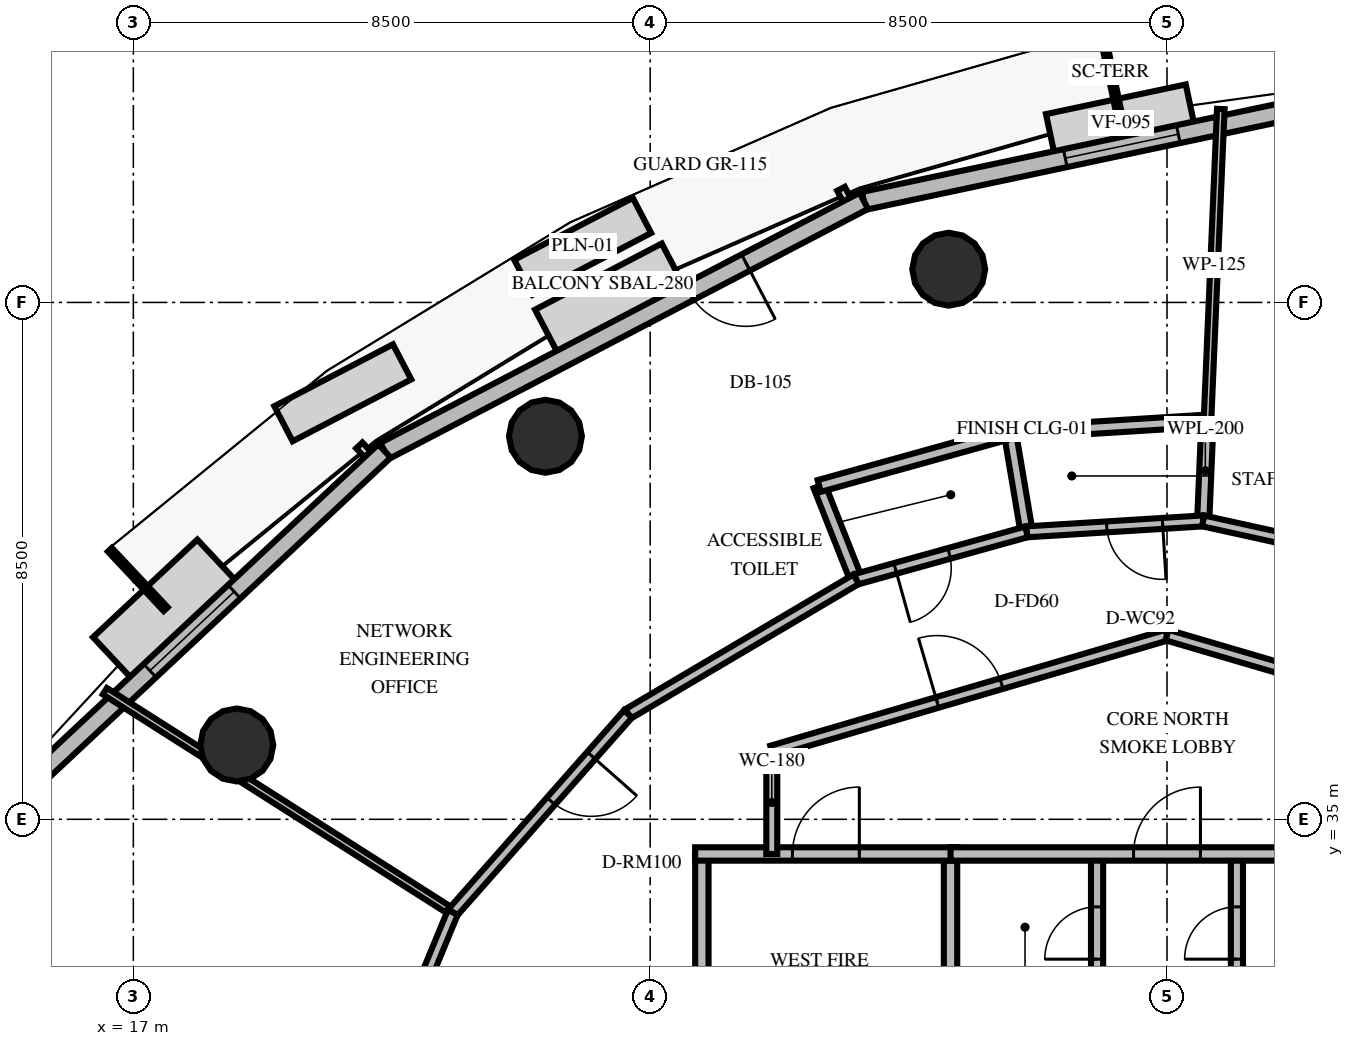
"""IFC4 building model, lengths in metres.
Left out: names, types, materials, properties, quantities, classifications, styles, units other than length and angle.
Written with IfcOpenShell. Run it as: python <this file> out.ifc"""

import sys

from ifc_helpers import new_model, si_unit, direction, frame, frame_2d, origin, origin_2d, place, context, subcontext, project, spatial, rectangle, circle, extrude, element, fill, save


model = new_model("IFC4")
c1 = context("Model", 3, precision=1e-05, world=origin(), true_north=direction((0.0, 1.0)))
c2 = subcontext(c1, "Body", "Model", "MODEL_VIEW")
j1 = project(units=[si_unit("LENGTHUNIT", "METRE"), si_unit("PLANEANGLEUNIT", "RADIAN")], contexts=[c1])
p1 = place(None, origin())
s1 = spatial("IfcSite", under=j1, at=p1, CompositionType="ELEMENT")
p2 = place(p1, origin())
s2 = spatial("IfcBuilding", under=s1, at=p2, CompositionType="ELEMENT")
p3 = place(p2, frame((0.0, 0.0, 149.8)))
s3 = spatial("IfcBuildingStorey", under=s2, at=p3, CompositionType="ELEMENT", Elevation=149.8)
for number, where, z_axis, x_axis in (
    (1, (30.41, 44.046, 0.0), (0.0, 0.0, 1.0), (1.0, 0.0, 0.0)),
    (2, (23.778, 41.299, 0.0), (0.0, 0.0, 1.0), (1.0, 0.0, 0.0)),
    (3, (18.701, 36.222, 0.0), (0.0, 0.0, 1.0), (1.0, 0.0, 0.0)),
):
    element("IfcColumn", number, at=place(p3, frame(where, z_axis=z_axis, x_axis=x_axis)), inside=s3, PredefinedType="COLUMN", context=c2, shape_type="SweptSolid", body=[
        extrude(circle(Radius=0.6, at=origin_2d()), origin(), (0.0, 0.0, 1.0), 4.0),
    ])
p4 = place(p3, frame((37.498, 46.97, 0.0), z_axis=(0.0, 0.0, 1.0), x_axis=(-0.978225120282, -0.207546655113, 0.0)))
e4 = element("IfcWall", 4, at=p4, inside=s3, PredefinedType="SOLIDWALL", context=c2, shape_type="SweptSolid", body=[
    extrude(rectangle(XDim=8.673, YDim=0.3, at=frame_2d((4.336, 0.0))), origin(), (0.0, 0.0, 1.0), 2.9),
])
p5 = place(p4, frame((3.386, 0.0, 0.8)))
e5 = element("IfcOpeningElement", 5, at=p5, cuts=e4, PredefinedType="OPENING", context=c2, shape_type="SweptSolid", body=[
    extrude(rectangle(XDim=1.9, YDim=1.95, at=frame_2d((0.95, 0.975))), frame((0.0, 0.16, 0.0), z_axis=(0.0, -1.0, 0.0), x_axis=(1.0, 0.0, 0.0)), (0.0, 0.0, 1.0), 0.32),
])
p6 = place(p3, frame((29.014, 45.17, 0.0), z_axis=(0.0, 0.0, 1.0), x_axis=(-0.886600513761, -0.462535975897, 0.0)))
e6 = element("IfcWall", 6, at=p6, inside=s3, PredefinedType="SOLIDWALL", context=c2, shape_type="SweptSolid", body=[
    extrude(rectangle(XDim=8.891, YDim=0.3, at=frame_2d((4.445, 0.0))), origin(), (0.0, 0.0, 1.0), 2.9),
])
p7 = place(p6, frame((2.19, 0.0, 0.0)))
e7 = element("IfcOpeningElement", 7, at=p7, cuts=e6, PredefinedType="OPENING", context=c2, shape_type="SweptSolid", body=[
    extrude(rectangle(XDim=1.05, YDim=2.15, at=frame_2d((0.525, 1.075))), frame((0.0, 0.16, 0.0), z_axis=(0.0, -1.0, 0.0), x_axis=(1.0, 0.0, 0.0)), (0.0, 0.0, 1.0), 0.32),
])
p8 = place(p3, frame((21.131, 41.057, 0.0), z_axis=(0.0, 0.0, 1.0), x_axis=(-0.729921586767, -0.683530889698, 0.0)))
e8 = element("IfcWall", 8, at=p8, inside=s3, PredefinedType="SOLIDWALL", context=c2, shape_type="SweptSolid", body=[
    extrude(rectangle(XDim=8.673, YDim=0.3, at=frame_2d((4.336, 0.0))), origin(), (0.0, 0.0, 1.0), 2.9),
])
p9 = place(p8, frame((3.386, 0.0, 0.8)))
e9 = element("IfcOpeningElement", 9, at=p9, cuts=e8, PredefinedType="OPENING", context=c2, shape_type="SweptSolid", body=[
    extrude(rectangle(XDim=1.9, YDim=1.95, at=frame_2d((0.95, 0.975))), frame((0.0, 0.16, 0.0), z_axis=(0.0, -1.0, 0.0), x_axis=(1.0, 0.0, 0.0)), (0.0, 0.0, 1.0), 0.32),
])
p10 = place(p3, frame((26.35, 30.05, 0.0), z_axis=(0.0, 0.0, 1.0), x_axis=(0.0, 1.0, 0.0)))
e10 = element("IfcWall", 10, at=p10, inside=s3, PredefinedType="SOLIDWALL", context=c2, shape_type="SweptSolid", body=[
    extrude(rectangle(XDim=4.38, YDim=0.22, at=frame_2d((2.19, 0.0))), origin(), (0.0, 0.0, 1.0), 2.8),
])
p11 = place(p3, frame((30.44, 30.05, 0.0), z_axis=(0.0, 0.0, 1.0), x_axis=(0.0, 1.0, 0.0)))
e11 = element("IfcWall", 11, at=p11, inside=s3, PredefinedType="SOLIDWALL", context=c2, shape_type="SweptSolid", body=[
    extrude(rectangle(XDim=4.38, YDim=0.22, at=frame_2d((2.19, 0.0))), origin(), (0.0, 0.0, 1.0), 2.8),
])
p12 = place(p11, frame((0.8, 0.0, 0.0)))
e12 = element("IfcOpeningElement", 12, at=p12, cuts=e11, PredefinedType="OPENING", context=c2, shape_type="SweptSolid", body=[
    extrude(rectangle(XDim=1.05, YDim=2.1, at=frame_2d((0.525, 1.05))), frame((0.0, 0.12, 0.0), z_axis=(0.0, -1.0, 0.0), x_axis=(1.0, 0.0, 0.0)), (0.0, 0.0, 1.0), 0.24),
])
p13 = place(p3, frame((26.24, 34.43, 0.0), z_axis=(0.0, 0.0, 1.0), x_axis=(1.0, 0.0, 0.0)))
e13 = element("IfcWall", 13, at=p13, inside=s3, PredefinedType="SOLIDWALL", context=c2, shape_type="SweptSolid", body=[
    extrude(rectangle(XDim=4.31, YDim=0.22, at=frame_2d((2.155, 0.0))), origin(), (0.0, 0.0, 1.0), 2.8),
])
p14 = place(p13, frame((1.6, 0.0, 0.0)))
e14 = element("IfcOpeningElement", 14, at=p14, cuts=e13, PredefinedType="OPENING", context=c2, shape_type="SweptSolid", body=[
    extrude(rectangle(XDim=1.1, YDim=2.15, at=frame_2d((0.55, 1.075))), frame((0.0, 0.12, 0.0), z_axis=(0.0, -1.0, 0.0), x_axis=(1.0, 0.0, 0.0)), (0.0, 0.0, 1.0), 0.24),
])
p15 = place(p3, frame((32.85, 30.05, 0.0), z_axis=(0.0, 0.0, 1.0), x_axis=(0.0, 1.0, 0.0)))
e15 = element("IfcWall", 15, at=p15, inside=s3, PredefinedType="SOLIDWALL", context=c2, shape_type="SweptSolid", body=[
    extrude(rectangle(XDim=4.38, YDim=0.2, at=frame_2d((2.19, 0.0))), origin(), (0.0, 0.0, 1.0), 2.8),
])
p16 = place(p15, frame((2.65, 0.0, 0.0)))
e16 = element("IfcOpeningElement", 16, at=p16, cuts=e15, PredefinedType="OPENING", context=c2, shape_type="SweptSolid", body=[
    extrude(rectangle(XDim=0.86, YDim=2.05, at=frame_2d((0.43, 1.025))), frame((0.0, 0.11, 0.0), z_axis=(0.0, -1.0, 0.0), x_axis=(1.0, 0.0, 0.0)), (0.0, 0.0, 1.0), 0.22),
])
p17 = place(p3, frame((35.15, 30.05, 0.0), z_axis=(0.0, 0.0, 1.0), x_axis=(0.0, 1.0, 0.0)))
e17 = element("IfcWall", 17, at=p17, inside=s3, PredefinedType="SOLIDWALL", context=c2, shape_type="SweptSolid", body=[
    extrude(rectangle(XDim=4.38, YDim=0.2, at=frame_2d((2.19, 0.0))), origin(), (0.0, 0.0, 1.0), 2.8),
])
p18 = place(p17, frame((2.65, 0.0, 0.0)))
e18 = element("IfcOpeningElement", 18, at=p18, cuts=e17, PredefinedType="OPENING", context=c2, shape_type="SweptSolid", body=[
    extrude(rectangle(XDim=0.86, YDim=2.05, at=frame_2d((0.43, 1.025))), frame((0.0, 0.11, 0.0), z_axis=(0.0, -1.0, 0.0), x_axis=(1.0, 0.0, 0.0)), (0.0, 0.0, 1.0), 0.22),
])
p19 = place(p3, frame((30.44, 34.43, 0.0), z_axis=(0.0, 0.0, 1.0), x_axis=(1.0, 0.0, 0.0)))
e19 = element("IfcWall", 19, at=p19, inside=s3, PredefinedType="SOLIDWALL", context=c2, shape_type="SweptSolid", body=[
    extrude(rectangle(XDim=7.12, YDim=0.22, at=frame_2d((3.56, 0.0))), origin(), (0.0, 0.0, 1.0), 2.8),
])
p20 = place(p19, frame((3.01, 0.0, 0.0)))
e20 = element("IfcOpeningElement", 20, at=p20, cuts=e19, PredefinedType="OPENING", context=c2, shape_type="SweptSolid", body=[
    extrude(rectangle(XDim=1.1, YDim=2.15, at=frame_2d((0.55, 1.075))), frame((0.0, 0.12, 0.0), z_axis=(0.0, -1.0, 0.0), x_axis=(1.0, 0.0, 0.0)), (0.0, 0.0, 1.0), 0.24),
])
p21 = place(p3, frame((27.5, 34.43, 0.0), z_axis=(0.0, 0.0, 1.0), x_axis=(0.0, 1.0, 0.0)))
e21 = element("IfcWall", 21, at=p21, inside=s3, PredefinedType="PARTITIONING", context=c2, shape_type="SweptSolid", body=[
    extrude(rectangle(XDim=1.693, YDim=0.18, at=frame_2d((0.846, 0.0))), origin(), (0.0, 0.0, 1.0), 2.8),
])
p22 = place(p3, frame((27.5, 36.123, 0.0), z_axis=(0.0, 0.0, 1.0), x_axis=(0.959546654541, 0.281549671923, 0.0)))
e22 = element("IfcWall", 22, at=p22, inside=s3, PredefinedType="PARTITIONING", context=c2, shape_type="SweptSolid", body=[
    extrude(rectangle(XDim=6.774, YDim=0.18, at=frame_2d((3.387, 0.0))), origin(), (0.0, 0.0, 1.0), 2.8),
])
p23 = place(p22, frame((2.837, 0.0, 0.0)))
e23 = element("IfcOpeningElement", 23, at=p23, cuts=e22, PredefinedType="OPENING", context=c2, shape_type="SweptSolid", body=[
    extrude(rectangle(XDim=1.1, YDim=2.15, at=frame_2d((0.55, 1.075))), frame((0.0, 0.1, 0.0), z_axis=(0.0, -1.0, 0.0), x_axis=(1.0, 0.0, 0.0)), (0.0, 0.0, 1.0), 0.2),
])
p24 = place(p3, frame((34.0, 38.03, 0.0), z_axis=(0.0, 0.0, 1.0), x_axis=(0.959546654541, -0.281549671923, 0.0)))
e24 = element("IfcWall", 24, at=p24, inside=s3, PredefinedType="PARTITIONING", context=c2, shape_type="SweptSolid", body=[
    extrude(rectangle(XDim=6.774, YDim=0.18, at=frame_2d((3.387, 0.0))), origin(), (0.0, 0.0, 1.0), 2.8),
])
p25 = place(p24, frame((2.837, 0.0, 0.0)))
e25 = element("IfcOpeningElement", 25, at=p25, cuts=e24, PredefinedType="OPENING", context=c2, shape_type="SweptSolid", body=[
    extrude(rectangle(XDim=1.1, YDim=2.15, at=frame_2d((0.55, 1.075))), frame((0.0, 0.1, 0.0), z_axis=(0.0, -1.0, 0.0), x_axis=(1.0, 0.0, 0.0)), (0.0, 0.0, 1.0), 0.2),
])
for number, where, z_axis, x_axis in (
    (26, (34.595, 39.907, 0.0), (0.0, 0.0, 1.0), (0.043, 0.999, 0.0)),
    (27, (31.691, 39.727, 0.0), (0.0, 0.0, 1.0), (-0.166, 0.986, 0.0)),
):
    element("IfcWall", number, at=place(p3, frame(where, z_axis=z_axis, x_axis=x_axis)), inside=s3, PredefinedType="PLUMBINGWALL", context=c2, shape_type="SweptSolid", body=[
        extrude(rectangle(XDim=1.65, YDim=0.2, at=frame_2d((0.825, 0.0))), origin(), (0.0, 0.0, 1.0), 2.8),
    ])
p26 = place(p3, frame((34.666, 41.556, 0.0), z_axis=(0.0, 0.0, 1.0), x_axis=(-0.998079045884, -0.061953354768, 0.0)))
e28 = element("IfcWall", 28, at=p26, inside=s3, PredefinedType="PLUMBINGWALL", context=c2, shape_type="SweptSolid", body=[
    extrude(rectangle(XDim=3.255, YDim=0.2, at=frame_2d((1.627, 0.0))), origin(), (0.0, 0.0, 1.0), 2.8),
])
p27 = place(p3, frame((34.595, 39.907, 0.0), z_axis=(0.0, 0.0, 1.0), x_axis=(-0.998081201235, -0.061918621933, 0.0)))
e29 = element("IfcWall", 29, at=p27, inside=s3, PredefinedType="PARTITIONING", context=c2, shape_type="SweptSolid", body=[
    extrude(rectangle(XDim=2.91, YDim=0.18, at=frame_2d((1.455, 0.0))), origin(), (0.0, 0.0, 1.0), 2.8),
])
p28 = place(p27, frame((0.669, 0.0, 0.0)))
e30 = element("IfcOpeningElement", 30, at=p28, cuts=e29, PredefinedType="OPENING", context=c2, shape_type="SweptSolid", body=[
    extrude(rectangle(XDim=0.92, YDim=2.1, at=frame_2d((0.46, 1.05))), frame((0.0, 0.1, 0.0), z_axis=(0.0, -1.0, 0.0), x_axis=(1.0, 0.0, 0.0)), (0.0, 0.0, 1.0), 0.2),
])
p29 = place(p3, frame((28.887, 38.947, 0.0), z_axis=(0.0, 0.0, 1.0), x_axis=(-0.367254125324, 0.930120641332, 0.0)))
e31 = element("IfcWall", 31, at=p29, inside=s3, PredefinedType="PLUMBINGWALL", context=c2, shape_type="SweptSolid", body=[
    extrude(rectangle(XDim=1.65, YDim=0.2, at=frame_2d((0.825, 0.0))), origin(), (0.0, 0.0, 1.0), 2.8),
])
p30 = place(p3, frame((31.417, 41.354, 0.0), z_axis=(0.0, 0.0, 1.0), x_axis=(-0.963397456195, -0.268077118377, 0.0)))
e32 = element("IfcWall", 32, at=p30, inside=s3, PredefinedType="PLUMBINGWALL", context=c2, shape_type="SweptSolid", body=[
    extrude(rectangle(XDim=3.255, YDim=0.2, at=frame_2d((1.627, 0.0))), origin(), (0.0, 0.0, 1.0), 2.8),
])
p31 = place(p3, frame((31.691, 39.727, 0.0), z_axis=(0.0, 0.0, 1.0), x_axis=(-0.96340966142, -0.268033252197, 0.0)))
e33 = element("IfcWall", 33, at=p31, inside=s3, PredefinedType="PARTITIONING", context=c2, shape_type="SweptSolid", body=[
    extrude(rectangle(XDim=2.91, YDim=0.18, at=frame_2d((1.455, 0.0))), origin(), (0.0, 0.0, 1.0), 2.8),
])
p32 = place(p31, frame((1.321, 0.0, 0.0)))
e34 = element("IfcOpeningElement", 34, at=p32, cuts=e33, PredefinedType="OPENING", context=c2, shape_type="SweptSolid", body=[
    extrude(rectangle(XDim=0.92, YDim=2.1, at=frame_2d((0.46, 1.05))), frame((0.0, 0.1, 0.0), z_axis=(0.0, -1.0, 0.0), x_axis=(1.0, 0.0, 0.0)), (0.0, 0.0, 1.0), 0.2),
])
p33 = place(p3, frame((34.666, 41.556, 0.0), z_axis=(0.0, 0.0, 1.0), x_axis=(0.04278458553, 0.999084320386, 0.0)))
e35 = element("IfcWall", 35, at=p33, inside=s3, PredefinedType="PARTITIONING", context=c2, shape_type="SweptSolid", body=[
    extrude(rectangle(XDim=5.13, YDim=0.125, at=frame_2d((2.565, 0.0))), origin(), (0.0, 0.0, 1.0), 2.8),
])
p34 = place(p3, frame((22.253, 33.469, 0.0), z_axis=(0.0, 0.0, 1.0), x_axis=(-0.843860112371, 0.536563240215, 0.0)))
e36 = element("IfcWall", 36, at=p34, inside=s3, PredefinedType="PARTITIONING", context=c2, shape_type="SweptSolid", body=[
    extrude(rectangle(XDim=6.78, YDim=0.125, at=frame_2d((3.39, 0.0))), origin(), (0.0, 0.0, 1.0), 2.8),
])
p35 = place(p3, frame((28.887, 38.947, 0.0), z_axis=(0.0, 0.0, 1.0), x_axis=(-0.861185337558, -0.508291072493, 0.0)))
e37 = element("IfcWall", 37, at=p35, inside=s3, PredefinedType="PARTITIONING", context=c2, shape_type="SweptSolid", body=[
    extrude(rectangle(XDim=4.355, YDim=0.18, at=frame_2d((2.177, 0.0))), origin(), (0.0, 0.0, 1.0), 2.8),
])
p36 = place(p3, frame((25.136, 36.733, 0.0), z_axis=(0.0, 0.0, 1.0), x_axis=(-0.661970118679, -0.749530227526, 0.0)))
e38 = element("IfcWall", 38, at=p36, inside=s3, PredefinedType="PARTITIONING", context=c2, shape_type="SweptSolid", body=[
    extrude(rectangle(XDim=4.355, YDim=0.18, at=frame_2d((2.178, 0.0))), origin(), (0.0, 0.0, 1.0), 2.8),
])
p37 = place(p36, frame((0.914, 0.0, 0.0)))
e39 = element("IfcOpeningElement", 39, at=p37, cuts=e38, PredefinedType="OPENING", context=c2, shape_type="SweptSolid", body=[
    extrude(rectangle(XDim=1.0, YDim=2.15, at=frame_2d((0.5, 1.075))), frame((0.0, 0.1, 0.0), z_axis=(0.0, -1.0, 0.0), x_axis=(1.0, 0.0, 0.0)), (0.0, 0.0, 1.0), 0.2),
])
p38 = place(p3, frame((22.253, 33.469, 0.0), z_axis=(0.0, 0.0, 1.0), x_axis=(-0.381884883338, -0.924209898171, 0.0)))
e40 = element("IfcWall", 40, at=p38, inside=s3, PredefinedType="PARTITIONING", context=c2, shape_type="SweptSolid", body=[
    extrude(rectangle(XDim=4.834, YDim=0.18, at=frame_2d((2.417, 0.0))), origin(), (0.0, 0.0, 1.0), 2.8),
])
p39 = place(p38, frame((1.842, 0.0, 0.0)))
e41 = element("IfcOpeningElement", 41, at=p39, cuts=e40, PredefinedType="OPENING", context=c2, shape_type="SweptSolid", body=[
    extrude(rectangle(XDim=1.15, YDim=2.15, at=frame_2d((0.575, 1.075))), frame((0.0, 0.1, 0.0), z_axis=(0.0, -1.0, 0.0), x_axis=(1.0, 0.0, 0.0)), (0.0, 0.0, 1.0), 0.2),
])
p40 = place(p3, frame((39.316, 38.865, 0.0), z_axis=(0.0, 0.0, 1.0), x_axis=(-0.976484389615, 0.215588118498, 0.0)))
e42 = element("IfcWall", 42, at=p40, inside=s3, PredefinedType="PARTITIONING", context=c2, shape_type="SweptSolid", body=[
    extrude(rectangle(XDim=4.834, YDim=0.18, at=frame_2d((2.417, 0.0))), origin(), (0.0, 0.0, 1.0), 2.8),
])
p41 = place(p5, origin())
e43 = element("IfcWindow", 43, at=p41, inside=s3, PartitioningType="SINGLE_PANEL", PredefinedType="WINDOW", context=c2, shape_type="SweptSolid", body=[
    extrude(rectangle(XDim=1.9, YDim=1.95, at=frame_2d((0.95, 0.975))), frame((0.0, 0.03, 0.0), z_axis=(0.0, -1.0, 0.0), x_axis=(1.0, 0.0, 0.0)), (0.0, 0.0, 1.0), 0.06),
])
fill(e5, e43)
p42 = place(p7, origin())
e44 = element("IfcDoor", 44, at=p42, inside=s3, OperationType="SINGLE_SWING_LEFT", PredefinedType="DOOR", context=c2, shape_type="SweptSolid", body=[
    extrude(rectangle(XDim=1.05, YDim=2.15, at=frame_2d((0.525, 1.075))), frame((0.0, 0.025, 0.0), z_axis=(0.0, -1.0, 0.0), x_axis=(1.0, 0.0, 0.0)), (0.0, 0.0, 1.0), 0.05),
])
fill(e7, e44)
p43 = place(p9, origin())
e45 = element("IfcWindow", 45, at=p43, inside=s3, PartitioningType="SINGLE_PANEL", PredefinedType="WINDOW", context=c2, shape_type="SweptSolid", body=[
    extrude(rectangle(XDim=1.9, YDim=1.95, at=frame_2d((0.95, 0.975))), frame((0.0, 0.03, 0.0), z_axis=(0.0, -1.0, 0.0), x_axis=(1.0, 0.0, 0.0)), (0.0, 0.0, 1.0), 0.06),
])
fill(e9, e45)
p44 = place(p14, origin())
e46 = element("IfcDoor", 46, at=p44, inside=s3, OperationType="SINGLE_SWING_RIGHT", PredefinedType="DOOR", context=c2, shape_type="SweptSolid", body=[
    extrude(rectangle(XDim=1.1, YDim=2.15, at=frame_2d((0.55, 1.075))), frame((0.0, 0.025, 0.0), z_axis=(0.0, -1.0, 0.0), x_axis=(1.0, 0.0, 0.0)), (0.0, 0.0, 1.0), 0.05),
])
fill(e14, e46)
p45 = place(p16, origin())
e47 = element("IfcDoor", 47, at=p45, inside=s3, OperationType="SINGLE_SWING_LEFT", PredefinedType="TRAPDOOR", context=c2, shape_type="SweptSolid", body=[
    extrude(rectangle(XDim=0.86, YDim=2.05, at=frame_2d((0.43, 1.025))), frame((0.0, 0.025, 0.0), z_axis=(0.0, -1.0, 0.0), x_axis=(1.0, 0.0, 0.0)), (0.0, 0.0, 1.0), 0.05),
])
fill(e16, e47)
p46 = place(p18, origin())
e48 = element("IfcDoor", 48, at=p46, inside=s3, OperationType="SINGLE_SWING_LEFT", PredefinedType="TRAPDOOR", context=c2, shape_type="SweptSolid", body=[
    extrude(rectangle(XDim=0.86, YDim=2.05, at=frame_2d((0.43, 1.025))), frame((0.0, 0.025, 0.0), z_axis=(0.0, -1.0, 0.0), x_axis=(1.0, 0.0, 0.0)), (0.0, 0.0, 1.0), 0.05),
])
fill(e18, e48)
p47 = place(p20, origin())
e49 = element("IfcDoor", 49, at=p47, inside=s3, OperationType="SINGLE_SWING_RIGHT", PredefinedType="DOOR", context=c2, shape_type="SweptSolid", body=[
    extrude(rectangle(XDim=1.1, YDim=2.15, at=frame_2d((0.55, 1.075))), frame((0.0, 0.025, 0.0), z_axis=(0.0, -1.0, 0.0), x_axis=(1.0, 0.0, 0.0)), (0.0, 0.0, 1.0), 0.05),
])
fill(e20, e49)
p48 = place(p23, origin())
e50 = element("IfcDoor", 50, at=p48, inside=s3, OperationType="SINGLE_SWING_LEFT", PredefinedType="DOOR", context=c2, shape_type="SweptSolid", body=[
    extrude(rectangle(XDim=1.1, YDim=2.15, at=frame_2d((0.55, 1.075))), frame((0.0, 0.025, 0.0), z_axis=(0.0, -1.0, 0.0), x_axis=(1.0, 0.0, 0.0)), (0.0, 0.0, 1.0), 0.05),
])
fill(e23, e50)
p49 = place(p28, origin())
e51 = element("IfcDoor", 51, at=p49, inside=s3, OperationType="SINGLE_SWING_LEFT", PredefinedType="DOOR", context=c2, shape_type="SweptSolid", body=[
    extrude(rectangle(XDim=0.92, YDim=2.1, at=frame_2d((0.46, 1.05))), frame((0.0, 0.025, 0.0), z_axis=(0.0, -1.0, 0.0), x_axis=(1.0, 0.0, 0.0)), (0.0, 0.0, 1.0), 0.05),
])
fill(e30, e51)
p50 = place(p32, origin())
e52 = element("IfcDoor", 52, at=p50, inside=s3, OperationType="SINGLE_SWING_RIGHT", PredefinedType="DOOR", context=c2, shape_type="SweptSolid", body=[
    extrude(rectangle(XDim=0.92, YDim=2.1, at=frame_2d((0.46, 1.05))), frame((0.0, 0.025, 0.0), z_axis=(0.0, -1.0, 0.0), x_axis=(1.0, 0.0, 0.0)), (0.0, 0.0, 1.0), 0.05),
])
fill(e34, e52)
p51 = place(p37, origin())
e53 = element("IfcDoor", 53, at=p51, inside=s3, OperationType="SINGLE_SWING_LEFT", PredefinedType="DOOR", context=c2, shape_type="SweptSolid", body=[
    extrude(rectangle(XDim=1.0, YDim=2.15, at=frame_2d((0.5, 1.075))), frame((0.0, 0.025, 0.0), z_axis=(0.0, -1.0, 0.0), x_axis=(1.0, 0.0, 0.0)), (0.0, 0.0, 1.0), 0.05),
])
fill(e39, e53)
save(model, sys.argv[1])
